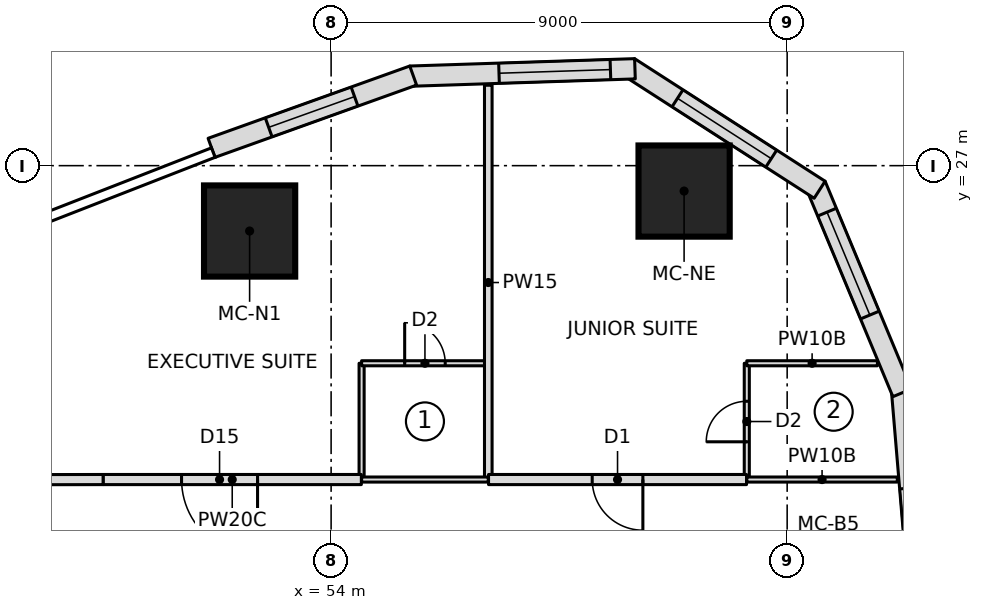
"""IFC4 building model, lengths in metres.
Left out: names, types, materials, properties, quantities, classifications, styles, units other than length and angle.
Written with IfcOpenShell. Run it as: python <this file> out.ifc"""

import sys

from ifc_helpers import new_model, si_unit, direction, frame, frame_2d, origin, origin_2d, place, context, subcontext, project, spatial, polyline, rectangle, outline, extrude, element, fill, save


model = new_model("IFC4")
c1 = context("Model", 3, precision=1e-05, world=origin(), true_north=direction((0.0, 1.0)))
c2 = subcontext(c1, "Body", "Model", "MODEL_VIEW")
j1 = project(units=[si_unit("LENGTHUNIT", "METRE"), si_unit("PLANEANGLEUNIT", "RADIAN")], contexts=[c1])
p1 = place(None, origin())
s1 = spatial("IfcSite", under=j1, at=p1, CompositionType="ELEMENT")
p2 = place(p1, origin())
s2 = spatial("IfcBuilding", under=s1, at=p2, CompositionType="ELEMENT")
p3 = place(p2, frame((0.0, 0.0, 35.0)))
s3 = spatial("IfcBuildingStorey", under=s2, at=p3, CompositionType="ELEMENT", Elevation=35.0)
for number, where, z_axis, x_axis in (
    (1, (60.966, 26.499, 0.0), (0.0, 0.0, 1.0), (1.0, 0.0, 0.0)),
    (2, (52.392, 25.71, 0.0), (0.0, 0.0, 1.0), (1.0, 0.0, 0.0)),
):
    element("IfcColumn", number, at=place(p3, frame(where, z_axis=z_axis, x_axis=x_axis)), inside=s3, PredefinedType="COLUMN", context=c2, shape_type="SweptSolid", body=[
        extrude(rectangle(XDim=1.8, YDim=1.8, at=origin_2d()), origin(), (0.0, 0.0, 1.0), 4.6),
    ])
p4 = place(p3, frame((65.603, 18.455, 0.0), z_axis=(0.0, 0.0, 1.0), x_axis=(-0.083793550906, 0.996483136248, 0.0)))
e3 = element("IfcWall", 3, at=p4, inside=s3, PredefinedType="NOTDEFINED", context=c2, shape_type="SweptSolid", body=[
    extrude(outline(polyline([(-0.002, -0.2), (4.136, -0.2), (4.074, 0.2), (0.002, 0.2), (-0.002, -0.2)])), origin(), (0.0, 0.0, 1.0), 4.3),
])
p5 = place(p4, frame((0.388, 0.0, 1.8)))
e4 = element("IfcOpeningElement", 4, at=p5, cuts=e3, PredefinedType="OPENING", context=c2, shape_type="SweptSolid", body=[
    extrude(rectangle(XDim=1.8, YDim=1.2, at=frame_2d((0.9, 0.6))), frame((0.0, 0.21, 0.0), z_axis=(0.0, -1.0, 0.0), x_axis=(1.0, 0.0, 0.0)), (0.0, 0.0, 1.0), 0.42),
])
p6 = place(p3, frame((65.259, 22.546, 0.0), z_axis=(0.0, 0.0, 1.0), x_axis=(-0.384372042685, 0.923178277908, 0.0)))
e5 = element("IfcWall", 5, at=p6, inside=s3, PredefinedType="NOTDEFINED", context=c2, shape_type="SweptSolid", body=[
    extrude(outline(polyline([(-0.031, -0.2), (4.408, -0.2), (4.283, 0.2), (0.031, 0.2), (-0.031, -0.2)])), origin(), (0.0, 0.0, 1.0), 4.3),
])
p7 = place(p6, frame((1.631, 0.0, 0.6)))
e6 = element("IfcOpeningElement", 6, at=p7, cuts=e5, PredefinedType="OPENING", context=c2, shape_type="SweptSolid", body=[
    extrude(outline(polyline([(0.0, 1.35), (0.084, 1.771), (0.322, 2.128), (0.679, 2.366), (1.1, 2.45), (1.521, 2.366), (1.878, 2.128), (2.116, 1.771), (2.2, 1.35), (2.2, 1.1), (2.116, 0.679), (1.878, 0.322), (1.521, 0.084), (1.1, 0.0), (0.679, 0.084), (0.322, 0.322), (0.084, 0.679), (0.0, 1.1), (0.0, 1.35)])), frame((0.0, 0.21, 0.0), z_axis=(0.0, -1.0, 0.0), x_axis=(1.0, 0.0, 0.0)), (0.0, 0.0, 1.0), 0.42),
])
p8 = place(p3, frame((63.588, 26.558, 0.0), z_axis=(0.0, 0.0, 1.0), x_axis=(-0.840937468718, 0.541132307025, 0.0)))
e7 = element("IfcWall", 7, at=p8, inside=s3, PredefinedType="NOTDEFINED", context=c2, shape_type="SweptSolid", body=[
    extrude(outline(polyline([(-0.062, -0.2), (4.409, -0.2), (4.284, 0.2), (0.062, 0.2), (-0.062, -0.2)])), origin(), (0.0, 0.0, 1.0), 4.3),
])
p9 = place(p8, frame((1.073, 0.0, 0.6)))
e8 = element("IfcOpeningElement", 8, at=p9, cuts=e7, PredefinedType="OPENING", context=c2, shape_type="SweptSolid", body=[
    extrude(outline(polyline([(0.0, 1.35), (0.084, 1.771), (0.322, 2.128), (0.679, 2.366), (1.1, 2.45), (1.521, 2.366), (1.878, 2.128), (2.116, 1.771), (2.2, 1.35), (2.2, 1.1), (2.116, 0.679), (1.878, 0.322), (1.521, 0.084), (1.1, 0.0), (0.679, 0.084), (0.322, 0.322), (0.084, 0.679), (0.0, 1.1), (0.0, 1.35)])), frame((0.0, 0.21, 0.0), z_axis=(0.0, -1.0, 0.0), x_axis=(1.0, 0.0, 0.0)), (0.0, 0.0, 1.0), 0.42),
])
p10 = place(p3, frame((59.934, 28.91, 0.0), z_axis=(0.0, 0.0, 1.0), x_axis=(-0.999463576228, -0.032749958686, 0.0)))
e9 = element("IfcWall", 9, at=p10, inside=s3, PredefinedType="NOTDEFINED", context=c2, shape_type="SweptSolid", body=[
    extrude(outline(polyline([(-0.062, -0.2), (4.378, -0.2), (4.315, 0.2), (0.062, 0.2), (-0.062, -0.2)])), origin(), (0.0, 0.0, 1.0), 4.3),
])
p11 = place(p10, frame((0.422, 0.0, 0.6)))
e10 = element("IfcOpeningElement", 10, at=p11, cuts=e9, PredefinedType="OPENING", context=c2, shape_type="SweptSolid", body=[
    extrude(outline(polyline([(0.0, 1.35), (0.084, 1.771), (0.322, 2.128), (0.679, 2.366), (1.1, 2.45), (1.521, 2.366), (1.878, 2.128), (2.116, 1.771), (2.2, 1.35), (2.2, 1.1), (2.116, 0.679), (1.878, 0.322), (1.521, 0.084), (1.1, 0.0), (0.679, 0.084), (0.322, 0.322), (0.084, 0.679), (0.0, 1.1), (0.0, 1.35)])), frame((0.0, 0.21, 0.0), z_axis=(0.0, -1.0, 0.0), x_axis=(1.0, 0.0, 0.0)), (0.0, 0.0, 1.0), 0.42),
])
p12 = place(p3, frame((55.59, 28.768, 0.0), z_axis=(0.0, 0.0, 1.0), x_axis=(-0.941339752885, -0.337460323057, 0.0)))
e11 = element("IfcWall", 11, at=p12, inside=s3, PredefinedType="NOTDEFINED", context=c2, shape_type="SweptSolid", body=[
    extrude(outline(polyline([(-0.031, -0.2), (4.196, -0.2), (4.196, 0.2), (0.031, 0.2), (-0.031, -0.2)])), origin(), (0.0, 0.0, 1.0), 4.3),
])
p13 = place(p12, frame((1.198, 0.0, 1.8)))
e12 = element("IfcOpeningElement", 12, at=p13, cuts=e11, PredefinedType="OPENING", context=c2, shape_type="SweptSolid", body=[
    extrude(rectangle(XDim=1.8, YDim=1.2, at=frame_2d((0.9, 0.6))), frame((0.0, 0.21, 0.0), z_axis=(0.0, -1.0, 0.0), x_axis=(1.0, 0.0, 0.0)), (0.0, 0.0, 1.0), 0.42),
])
p14 = place(p3, frame((54.602, 20.8, 0.0), z_axis=(0.0, 0.0, 1.0), x_axis=(0.0, 1.0, 0.0)))
e13 = element("IfcWall", 13, at=p14, inside=s3, PredefinedType="PARTITIONING", context=c2, shape_type="SweptSolid", body=[
    extrude(rectangle(XDim=2.3, YDim=0.1, at=frame_2d((1.15, 0.0))), origin(), (0.0, 0.0, 1.0), 4.3),
])
p15 = place(p3, frame((54.602, 23.1, 0.0), z_axis=(0.0, 0.0, 1.0), x_axis=(1.0, 0.0, 0.0)))
e14 = element("IfcWall", 14, at=p15, inside=s3, PredefinedType="PARTITIONING", context=c2, shape_type="SweptSolid", body=[
    extrude(rectangle(XDim=2.5, YDim=0.1, at=frame_2d((1.25, 0.0))), origin(), (0.0, 0.0, 1.0), 4.3),
])
p16 = place(p15, frame((0.85, 0.0, 0.0)))
e15 = element("IfcOpeningElement", 15, at=p16, cuts=e14, PredefinedType="OPENING", context=c2, shape_type="SweptSolid", body=[
    extrude(rectangle(XDim=0.8, YDim=2.1, at=frame_2d((0.4, 1.05))), frame((0.0, 0.06, 0.0), z_axis=(0.0, -1.0, 0.0), x_axis=(1.0, 0.0, 0.0)), (0.0, 0.0, 1.0), 0.12),
])
p17 = place(p3, frame((62.203, 20.8, 0.0), z_axis=(0.0, 0.0, 1.0), x_axis=(0.0, 1.0, 0.0)))
e16 = element("IfcWall", 16, at=p17, inside=s3, PredefinedType="PARTITIONING", context=c2, shape_type="SweptSolid", body=[
    extrude(rectangle(XDim=2.3, YDim=0.1, at=frame_2d((1.15, 0.0))), origin(), (0.0, 0.0, 1.0), 4.3),
])
p18 = place(p17, frame((0.75, 0.0, 0.0)))
e17 = element("IfcOpeningElement", 17, at=p18, cuts=e16, PredefinedType="OPENING", context=c2, shape_type="SweptSolid", body=[
    extrude(rectangle(XDim=0.8, YDim=2.1, at=frame_2d((0.4, 1.05))), frame((0.0, 0.06, 0.0), z_axis=(0.0, -1.0, 0.0), x_axis=(1.0, 0.0, 0.0)), (0.0, 0.0, 1.0), 0.12),
])
p19 = place(p3, frame((62.203, 23.1, 0.0), z_axis=(0.0, 0.0, 1.0), x_axis=(1.0, 0.0, 0.0)))
e18 = element("IfcWall", 18, at=p19, inside=s3, PredefinedType="PARTITIONING", context=c2, shape_type="SweptSolid", body=[
    extrude(rectangle(XDim=2.578, YDim=0.1, at=frame_2d((1.289, 0.0))), origin(), (0.0, 0.0, 1.0), 4.3),
])
p20 = place(p3, frame((57.102, 20.8, 0.0), z_axis=(0.0, 0.0, 1.0), x_axis=(0.0, 1.0, 0.0)))
e19 = element("IfcWall", 19, at=p20, inside=s3, PredefinedType="PARTITIONING", context=c2, shape_type="SweptSolid", body=[
    extrude(rectangle(XDim=7.787, YDim=0.15, at=frame_2d((3.894, 0.0))), origin(), (0.0, 0.0, 1.0), 4.3),
])
p21 = place(p3, frame((54.597, 20.805, 0.0), z_axis=(0.0, 0.0, 1.0), x_axis=(-1.0, 0.0, 0.0)))
e20 = element("IfcWall", 20, at=p21, inside=s3, PredefinedType="PARTITIONING", context=c2, shape_type="SweptSolid", body=[
    extrude(rectangle(XDim=5.097, YDim=0.2, at=frame_2d((2.548, 0.0))), origin(), (0.0, 0.0, 1.0), 4.3),
])
p22 = place(p21, frame((2.048, 0.0, 0.0)))
e21 = element("IfcOpeningElement", 21, at=p22, cuts=e20, PredefinedType="OPENING", context=c2, shape_type="SweptSolid", body=[
    extrude(rectangle(XDim=1.5, YDim=2.1, at=frame_2d((0.75, 1.05))), frame((0.0, 0.11, 0.0), z_axis=(0.0, -1.0, 0.0), x_axis=(1.0, 0.0, 0.0)), (0.0, 0.0, 1.0), 0.22),
])
p23 = place(p3, frame((62.198, 20.805, 0.0), z_axis=(0.0, 0.0, 1.0), x_axis=(-1.0, 0.0, 0.0)))
e22 = element("IfcWall", 22, at=p23, inside=s3, PredefinedType="PARTITIONING", context=c2, shape_type="SweptSolid", body=[
    extrude(rectangle(XDim=5.092, YDim=0.2, at=frame_2d((2.546, 0.0))), origin(), (0.0, 0.0, 1.0), 4.3),
])
p24 = place(p23, frame((2.046, 0.0, 0.0)))
e23 = element("IfcOpeningElement", 23, at=p24, cuts=e22, PredefinedType="OPENING", context=c2, shape_type="SweptSolid", body=[
    extrude(rectangle(XDim=1.0, YDim=2.1, at=frame_2d((0.5, 1.05))), frame((0.0, 0.11, 0.0), z_axis=(0.0, -1.0, 0.0), x_axis=(1.0, 0.0, 0.0)), (0.0, 0.0, 1.0), 0.22),
])
p25 = place(p3, frame((57.102, 20.805, 0.0), z_axis=(0.0, 0.0, 1.0), x_axis=(-1.0, 0.0, 0.0)))
e24 = element("IfcWall", 24, at=p25, inside=s3, PredefinedType="PARTITIONING", context=c2, shape_type="SweptSolid", body=[
    extrude(rectangle(XDim=2.5, YDim=0.1, at=frame_2d((1.25, 0.0))), origin(), (0.0, 0.0, 1.0), 4.3),
])
p26 = place(p3, frame((65.175, 20.805, 0.0), z_axis=(0.0, 0.0, 1.0), x_axis=(-1.0, 0.0, 0.0)))
e25 = element("IfcWall", 25, at=p26, inside=s3, PredefinedType="PARTITIONING", context=c2, shape_type="SweptSolid", body=[
    extrude(rectangle(XDim=2.971, YDim=0.1, at=frame_2d((1.486, 0.0))), origin(), (0.0, 0.0, 1.0), 4.3),
])
p27 = place(p3, frame((49.5, 20.805, 0.0), z_axis=(0.0, 0.0, 1.0), x_axis=(-0.999998683182, -0.001622847587, 0.0)))
e26 = element("IfcWall", 26, at=p27, inside=s3, PredefinedType="PARTITIONING", context=c2, shape_type="SweptSolid", body=[
    extrude(rectangle(XDim=1.504, YDim=0.2, at=frame_2d((0.752, 0.0))), origin(), (0.0, 0.0, 1.0), 4.3),
])
p28 = place(p5, origin())
e27 = element("IfcWindow", 27, at=p28, inside=s3, PartitioningType="SINGLE_PANEL", PredefinedType="WINDOW", context=c2, shape_type="SweptSolid", body=[
    extrude(rectangle(XDim=1.8, YDim=1.2, at=frame_2d((0.9, 0.6))), frame((0.0, 0.17, 0.0), z_axis=(0.0, -1.0, 0.0), x_axis=(1.0, 0.0, 0.0)), (0.0, 0.0, 1.0), 0.06),
])
fill(e4, e27)
p29 = place(p7, origin())
e28 = element("IfcWindow", 28, at=p29, inside=s3, PartitioningType="SINGLE_PANEL", PredefinedType="WINDOW", context=c2, shape_type="SweptSolid", body=[
    extrude(outline(polyline([(0.0, 1.35), (0.084, 1.771), (0.322, 2.128), (0.679, 2.366), (1.1, 2.45), (1.521, 2.366), (1.878, 2.128), (2.116, 1.771), (2.2, 1.35), (2.2, 1.1), (2.116, 0.679), (1.878, 0.322), (1.521, 0.084), (1.1, 0.0), (0.679, 0.084), (0.322, 0.322), (0.084, 0.679), (0.0, 1.1), (0.0, 1.35)])), frame((0.0, 0.17, 0.0), z_axis=(0.0, -1.0, 0.0), x_axis=(1.0, 0.0, 0.0)), (0.0, 0.0, 1.0), 0.06),
])
fill(e6, e28)
p30 = place(p9, origin())
e29 = element("IfcWindow", 29, at=p30, inside=s3, PartitioningType="SINGLE_PANEL", PredefinedType="WINDOW", context=c2, shape_type="SweptSolid", body=[
    extrude(outline(polyline([(0.0, 1.35), (0.084, 1.771), (0.322, 2.128), (0.679, 2.366), (1.1, 2.45), (1.521, 2.366), (1.878, 2.128), (2.116, 1.771), (2.2, 1.35), (2.2, 1.1), (2.116, 0.679), (1.878, 0.322), (1.521, 0.084), (1.1, 0.0), (0.679, 0.084), (0.322, 0.322), (0.084, 0.679), (0.0, 1.1), (0.0, 1.35)])), frame((0.0, 0.17, 0.0), z_axis=(0.0, -1.0, 0.0), x_axis=(1.0, 0.0, 0.0)), (0.0, 0.0, 1.0), 0.06),
])
fill(e8, e29)
p31 = place(p11, origin())
e30 = element("IfcWindow", 30, at=p31, inside=s3, PartitioningType="SINGLE_PANEL", PredefinedType="WINDOW", context=c2, shape_type="SweptSolid", body=[
    extrude(outline(polyline([(0.0, 1.35), (0.084, 1.771), (0.322, 2.128), (0.679, 2.366), (1.1, 2.45), (1.521, 2.366), (1.878, 2.128), (2.116, 1.771), (2.2, 1.35), (2.2, 1.1), (2.116, 0.679), (1.878, 0.322), (1.521, 0.084), (1.1, 0.0), (0.679, 0.084), (0.322, 0.322), (0.084, 0.679), (0.0, 1.1), (0.0, 1.35)])), frame((0.0, 0.17, 0.0), z_axis=(0.0, -1.0, 0.0), x_axis=(1.0, 0.0, 0.0)), (0.0, 0.0, 1.0), 0.06),
])
fill(e10, e30)
p32 = place(p13, origin())
e31 = element("IfcWindow", 31, at=p32, inside=s3, PartitioningType="SINGLE_PANEL", PredefinedType="WINDOW", context=c2, shape_type="SweptSolid", body=[
    extrude(rectangle(XDim=1.8, YDim=1.2, at=frame_2d((0.9, 0.6))), frame((0.0, 0.17, 0.0), z_axis=(0.0, -1.0, 0.0), x_axis=(1.0, 0.0, 0.0)), (0.0, 0.0, 1.0), 0.06),
])
fill(e12, e31)
p33 = place(p16, origin())
e32 = element("IfcDoor", 32, at=p33, inside=s3, OperationType="SINGLE_SWING_LEFT", PredefinedType="DOOR", context=c2, shape_type="SweptSolid", body=[
    extrude(rectangle(XDim=0.8, YDim=2.1, at=frame_2d((0.4, 1.05))), frame((0.0, 0.025, 0.0), z_axis=(0.0, -1.0, 0.0), x_axis=(1.0, 0.0, 0.0)), (0.0, 0.0, 1.0), 0.05),
])
fill(e15, e32)
p34 = place(p18, origin())
e33 = element("IfcDoor", 33, at=p34, inside=s3, OperationType="SINGLE_SWING_LEFT", PredefinedType="DOOR", context=c2, shape_type="SweptSolid", body=[
    extrude(rectangle(XDim=0.8, YDim=2.1, at=frame_2d((0.4, 1.05))), frame((0.0, 0.025, 0.0), z_axis=(0.0, -1.0, 0.0), x_axis=(1.0, 0.0, 0.0)), (0.0, 0.0, 1.0), 0.05),
])
fill(e17, e33)
p35 = place(p22, origin())
e34 = element("IfcDoor", 34, at=p35, inside=s3, OperationType="DOUBLE_DOOR_SINGLE_SWING", PredefinedType="DOOR", context=c2, shape_type="SweptSolid", body=[
    extrude(rectangle(XDim=1.5, YDim=2.1, at=frame_2d((0.75, 1.05))), frame((0.0, 0.025, 0.0), z_axis=(0.0, -1.0, 0.0), x_axis=(1.0, 0.0, 0.0)), (0.0, 0.0, 1.0), 0.05),
])
fill(e21, e34)
p36 = place(p24, origin())
e35 = element("IfcDoor", 35, at=p36, inside=s3, OperationType="SINGLE_SWING_LEFT", PredefinedType="DOOR", context=c2, shape_type="SweptSolid", body=[
    extrude(rectangle(XDim=1.0, YDim=2.1, at=frame_2d((0.5, 1.05))), frame((0.0, 0.025, 0.0), z_axis=(0.0, -1.0, 0.0), x_axis=(1.0, 0.0, 0.0)), (0.0, 0.0, 1.0), 0.05),
])
fill(e23, e35)
save(model, sys.argv[1])
